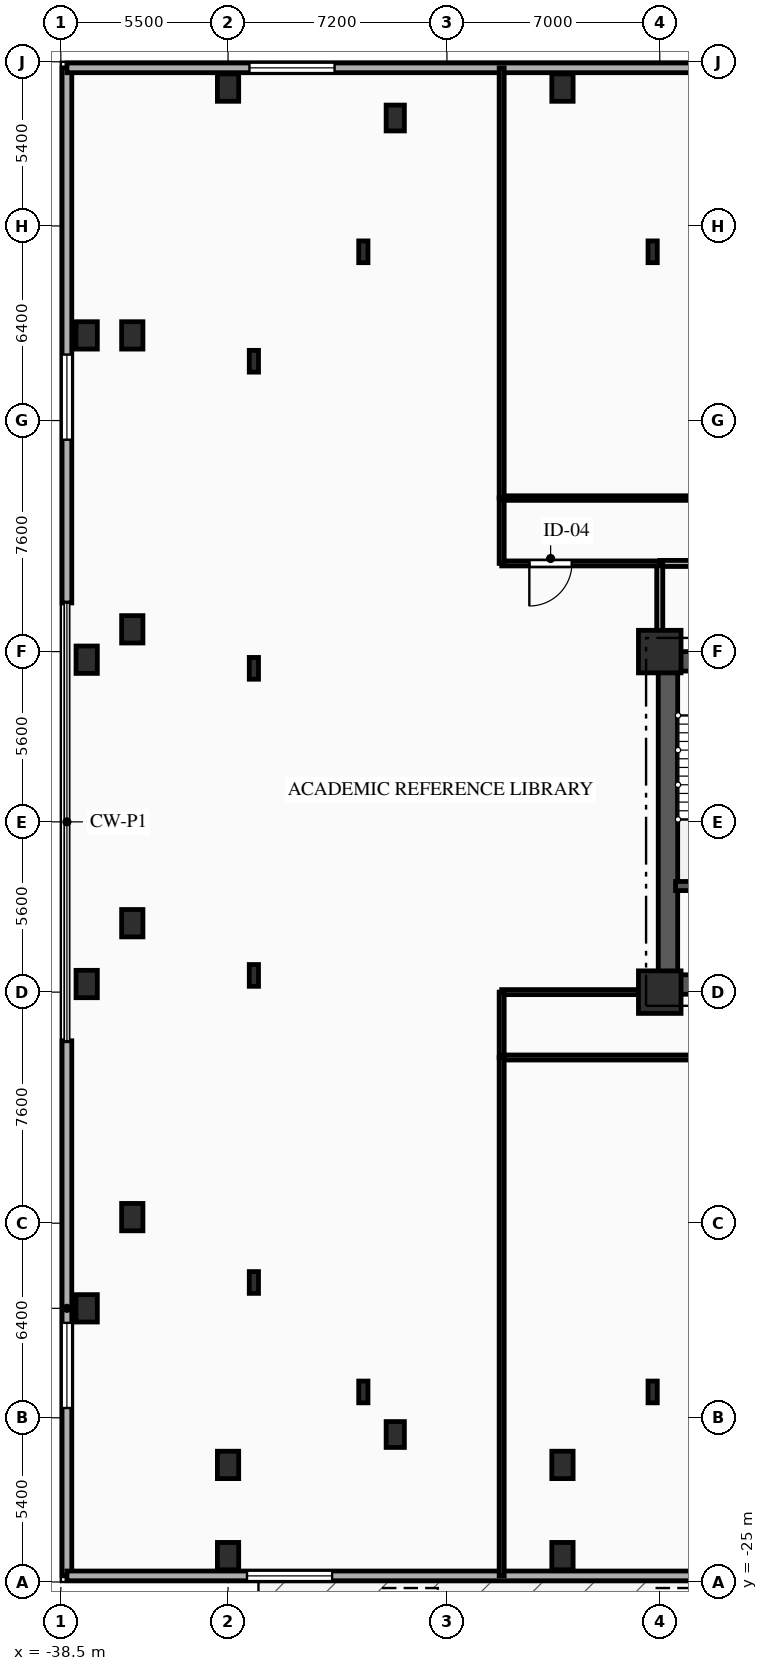
"""IFC4 building model, lengths in metres.
Left out: names, types, materials, properties, quantities, classifications, styles, units other than length and angle.
Written with IfcOpenShell. Run it as: python <this file> out.ifc"""

import sys

from ifc_helpers import new_model, si_unit, direction, frame, frame_2d, origin, origin_2d, place, context, subcontext, project, spatial, rectangle, i_section, extrude, element, fill, save


model = new_model("IFC4")
c1 = context("Model", 3, precision=1e-05, world=origin(), true_north=direction((0.0, 1.0)))
c2 = subcontext(c1, "Body", "Model", "MODEL_VIEW")
j1 = project(units=[si_unit("LENGTHUNIT", "METRE"), si_unit("PLANEANGLEUNIT", "RADIAN")], contexts=[c1])
p1 = place(None, origin())
s1 = spatial("IfcSite", under=j1, at=p1, CompositionType="ELEMENT")
p2 = place(p1, origin())
s2 = spatial("IfcBuilding", under=s1, at=p2, CompositionType="ELEMENT")
p3 = place(p2, frame((0.0, 0.0, 4.5)))
s3 = spatial("IfcBuildingStorey", under=s2, at=p3, CompositionType="ELEMENT", Elevation=4.5)
for number, where, z_axis, x_axis in (
    (1, (-18.8, -5.6, 0.0), (0.0, 0.0, 1.0), (1.0, 0.0, 0.0)),
    (2, (-18.8, 5.6, 0.0), (0.0, 0.0, 1.0), (1.0, 0.0, 0.0)),
):
    element("IfcColumn", number, at=place(p3, frame(where, z_axis=z_axis, x_axis=x_axis)), inside=s3, PredefinedType="COLUMN", context=c2, shape_type="SweptSolid", body=[
        extrude(rectangle(XDim=1.4, YDim=1.4, at=origin_2d()), origin(), (0.0, 0.0, 1.0), 4.5),
    ])
for number, where, z_axis, x_axis in (
    (3, (-33.0, -21.15, 0.0), (0.0, 0.0, 1.0), (1.0, 0.0, 0.0)),
    (4, (-22.0, -21.15, 0.0), (0.0, 0.0, 1.0), (1.0, 0.0, 0.0)),
    (5, (-33.0, 24.15, 0.0), (0.0, 0.0, 1.0), (1.0, 0.0, 0.0)),
    (6, (-22.0, 24.15, 0.0), (0.0, 0.0, 1.0), (1.0, 0.0, 0.0)),
    (7, (-36.15, -13.0, 0.0), (0.0, 0.0, 1.0), (1.0, 0.0, 0.0)),
    (8, (-36.15, -3.333, 0.0), (0.0, 0.0, 1.0), (1.0, 0.0, 0.0)),
    (9, (-36.15, 6.333, 0.0), (0.0, 0.0, 1.0), (1.0, 0.0, 0.0)),
    (10, (-36.15, 16.0, 0.0), (0.0, 0.0, 1.0), (1.0, 0.0, 0.0)),
    (11, (-33.0, -24.15, 0.0), (0.0, 0.0, 1.0), (1.0, 0.0, 0.0)),
    (12, (-22.0, -24.15, 0.0), (0.0, 0.0, 1.0), (1.0, 0.0, 0.0)),
    (13, (-37.65, -16.0, 0.0), (0.0, 0.0, 1.0), (1.0, 0.0, 0.0)),
    (14, (-37.65, -5.333, 0.0), (0.0, 0.0, 1.0), (1.0, 0.0, 0.0)),
    (15, (-37.65, 5.333, 0.0), (0.0, 0.0, 1.0), (1.0, 0.0, 0.0)),
    (16, (-37.65, 16.0, 0.0), (0.0, 0.0, 1.0), (1.0, 0.0, 0.0)),
):
    element("IfcColumn", number, at=place(p3, frame(where, z_axis=z_axis, x_axis=x_axis)), inside=s3, PredefinedType="COLUMN", context=c2, shape_type="SweptSolid", body=[
        extrude(rectangle(XDim=0.7, YDim=0.9, at=origin_2d()), origin(), (0.0, 0.0, 1.0), 4.5),
    ])
for number, where, z_axis, x_axis in (
    (17, (-27.5, -20.15, 0.0), (0.0, 0.0, 1.0), (1.0, 0.0, 0.0)),
    (18, (-27.5, 23.15, 0.0), (0.0, 0.0, 1.0), (1.0, 0.0, 0.0)),
):
    element("IfcColumn", number, at=place(p3, frame(where, z_axis=z_axis, x_axis=x_axis)), inside=s3, PredefinedType="PILASTER", context=c2, shape_type="SweptSolid", body=[
        extrude(rectangle(XDim=0.6, YDim=0.85, at=origin_2d()), origin(), (0.0, 0.0, 1.0), 4.5),
    ])
for number, where, z_axis, x_axis in (
    (19, (-28.55, -18.75, 0.0), (0.0, 0.0, 1.0), (1.0, 0.0, 0.0)),
    (20, (-19.033, -18.75, 0.0), (0.0, 0.0, 1.0), (1.0, 0.0, 0.0)),
    (21, (-19.033, 18.75, 0.0), (0.0, 0.0, 1.0), (1.0, 0.0, 0.0)),
    (22, (-28.55, 18.75, 0.0), (0.0, 0.0, 1.0), (1.0, 0.0, 0.0)),
    (23, (-32.15, 15.15, 0.0), (0.0, 0.0, 1.0), (1.0, 0.0, 0.0)),
    (24, (-32.15, 5.05, 0.0), (0.0, 0.0, 1.0), (1.0, 0.0, 0.0)),
    (25, (-32.15, -5.05, 0.0), (0.0, 0.0, 1.0), (1.0, 0.0, 0.0)),
    (26, (-32.15, -15.15, 0.0), (0.0, 0.0, 1.0), (1.0, 0.0, 0.0)),
):
    element("IfcColumn", number, at=place(p3, frame(where, z_axis=z_axis, x_axis=x_axis)), inside=s3, PredefinedType="COLUMN", context=c2, shape_type="SweptSolid", body=[
        extrude(i_section(OverallWidth=0.304, OverallDepth=0.716, WebThickness=0.021, FlangeThickness=0.04, FilletRadius=0.027, at=origin_2d()), origin(), (0.0, 0.0, 1.0), 4.5),
    ])
p4 = place(p3, frame((-38.3, -24.8, 0.0), z_axis=(0.0, 0.0, 1.0), x_axis=(0.0, 1.0, 0.0)))
e27 = element("IfcWall", 27, at=p4, inside=s3, PredefinedType="SOLIDWALL", context=c2, shape_type="SweptSolid", body=[
    extrude(rectangle(XDim=17.6, YDim=0.32, at=frame_2d((8.8, 0.0))), origin(), (0.0, 0.0, 1.0), 4.17),
])
p5 = place(p4, frame((5.522, 0.0, 0.85)))
e28 = element("IfcOpeningElement", 28, at=p5, cuts=e27, PredefinedType="OPENING", context=c2, shape_type="SweptSolid", body=[
    extrude(rectangle(XDim=2.8, YDim=2.4, at=frame_2d((1.4, 1.2))), frame((0.0, 0.17, 0.0), z_axis=(0.0, -1.0, 0.0), x_axis=(1.0, 0.0, 0.0)), (0.0, 0.0, 1.0), 0.34),
])
p6 = place(p3, frame((-38.3, 7.2, 0.0), z_axis=(0.0, 0.0, 1.0), x_axis=(0.0, 1.0, 0.0)))
e29 = element("IfcWall", 29, at=p6, inside=s3, PredefinedType="SOLIDWALL", context=c2, shape_type="SweptSolid", body=[
    extrude(rectangle(XDim=17.6, YDim=0.32, at=frame_2d((8.8, 0.0))), origin(), (0.0, 0.0, 1.0), 4.17),
])
p7 = place(p6, frame((5.37, 0.0, 0.85)))
e30 = element("IfcOpeningElement", 30, at=p7, cuts=e29, PredefinedType="OPENING", context=c2, shape_type="SweptSolid", body=[
    extrude(rectangle(XDim=2.8, YDim=2.4, at=frame_2d((1.4, 1.2))), frame((0.0, 0.17, 0.0), z_axis=(0.0, -1.0, 0.0), x_axis=(1.0, 0.0, 0.0)), (0.0, 0.0, 1.0), 0.34),
])
p8 = place(p3, frame((-38.3, 24.8, 0.0), z_axis=(0.0, 0.0, 1.0), x_axis=(1.0, 0.0, 0.0)))
e31 = element("IfcWall", 31, at=p8, inside=s3, PredefinedType="SOLIDWALL", context=c2, shape_type="SweptSolid", body=[
    extrude(rectangle(XDim=76.6, YDim=0.32, at=frame_2d((38.3, 0.0))), origin(), (0.0, 0.0, 1.0), 4.17),
])
p9 = place(p8, frame((6.004, 0.0, 0.85)))
e32 = element("IfcOpeningElement", 32, at=p9, cuts=e31, PredefinedType="OPENING", context=c2, shape_type="SweptSolid", body=[
    extrude(rectangle(XDim=2.8, YDim=2.4, at=frame_2d((1.4, 1.2))), frame((0.0, 0.17, 0.0), z_axis=(0.0, -1.0, 0.0), x_axis=(1.0, 0.0, 0.0)), (0.0, 0.0, 1.0), 0.34),
])
p10 = place(p8, frame((30.291, 0.0, 0.85)))
e33 = element("IfcOpeningElement", 33, at=p10, cuts=e31, PredefinedType="OPENING", context=c2, shape_type="SweptSolid", body=[
    extrude(rectangle(XDim=2.8, YDim=2.4, at=frame_2d((1.4, 1.2))), frame((0.0, 0.17, 0.0), z_axis=(0.0, -1.0, 0.0), x_axis=(1.0, 0.0, 0.0)), (0.0, 0.0, 1.0), 0.34),
])
p11 = place(p8, frame((67.876, 0.0, 0.85)))
e34 = element("IfcOpeningElement", 34, at=p11, cuts=e31, PredefinedType="OPENING", context=c2, shape_type="SweptSolid", body=[
    extrude(rectangle(XDim=2.8, YDim=2.4, at=frame_2d((1.4, 1.2))), frame((0.0, 0.17, 0.0), z_axis=(0.0, -1.0, 0.0), x_axis=(1.0, 0.0, 0.0)), (0.0, 0.0, 1.0), 0.34),
])
p12 = place(p3, frame((38.3, -24.8, 0.0), z_axis=(0.0, 0.0, 1.0), x_axis=(-1.0, 0.0, 0.0)))
e35 = element("IfcWall", 35, at=p12, inside=s3, PredefinedType="SOLIDWALL", context=c2, shape_type="SweptSolid", body=[
    extrude(rectangle(XDim=76.6, YDim=0.32, at=frame_2d((38.3, 0.0))), origin(), (0.0, 0.0, 1.0), 4.17),
])
p13 = place(p12, frame((6.004, 0.0, 0.85)))
e36 = element("IfcOpeningElement", 36, at=p13, cuts=e35, PredefinedType="OPENING", context=c2, shape_type="SweptSolid", body=[
    extrude(rectangle(XDim=2.8, YDim=2.4, at=frame_2d((1.4, 1.2))), frame((0.0, 0.17, 0.0), z_axis=(0.0, -1.0, 0.0), x_axis=(1.0, 0.0, 0.0)), (0.0, 0.0, 1.0), 0.34),
])
p14 = place(p12, frame((30.697, 0.0, 0.85)))
e37 = element("IfcOpeningElement", 37, at=p14, cuts=e35, PredefinedType="OPENING", context=c2, shape_type="SweptSolid", body=[
    extrude(rectangle(XDim=2.8, YDim=2.4, at=frame_2d((1.4, 1.2))), frame((0.0, 0.17, 0.0), z_axis=(0.0, -1.0, 0.0), x_axis=(1.0, 0.0, 0.0)), (0.0, 0.0, 1.0), 0.34),
])
p15 = place(p12, frame((50.587, 0.0, 0.85)))
e38 = element("IfcOpeningElement", 38, at=p15, cuts=e35, PredefinedType="OPENING", context=c2, shape_type="SweptSolid", body=[
    extrude(rectangle(XDim=2.8, YDim=2.4, at=frame_2d((1.4, 1.2))), frame((0.0, 0.17, 0.0), z_axis=(0.0, -1.0, 0.0), x_axis=(1.0, 0.0, 0.0)), (0.0, 0.0, 1.0), 0.34),
])
p16 = place(p12, frame((67.876, 0.0, 0.85)))
e39 = element("IfcOpeningElement", 39, at=p16, cuts=e35, PredefinedType="OPENING", context=c2, shape_type="SweptSolid", body=[
    extrude(rectangle(XDim=2.8, YDim=2.4, at=frame_2d((1.4, 1.2))), frame((0.0, 0.17, 0.0), z_axis=(0.0, -1.0, 0.0), x_axis=(1.0, 0.0, 0.0)), (0.0, 0.0, 1.0), 0.34),
])
p17 = place(p3, frame((-18.8, 5.28, 0.0), z_axis=(0.0, 0.0, 1.0), x_axis=(1.0, 0.0, 0.0)))
e40 = element("IfcWall", 40, at=p17, inside=s3, PredefinedType="SHEAR", context=c2, shape_type="SweptSolid", body=[
    extrude(rectangle(XDim=9.6, YDim=0.64, at=frame_2d((4.8, 0.0))), origin(), (0.0, 0.0, 1.0), 4.17),
])
p18 = place(p17, frame((1.55, 0.0, 0.0)))
e41 = element("IfcOpeningElement", 41, at=p18, cuts=e40, PredefinedType="OPENING", context=c2, shape_type="SweptSolid", body=[
    extrude(rectangle(XDim=1.1, YDim=2.15, at=frame_2d((0.55, 1.075))), frame((0.0, 0.33, 0.0), z_axis=(0.0, -1.0, 0.0), x_axis=(1.0, 0.0, 0.0)), (0.0, 0.0, 1.0), 0.66),
])
p19 = place(p17, frame((4.775, 0.0, 0.0)))
e42 = element("IfcOpeningElement", 42, at=p19, cuts=e40, PredefinedType="OPENING", context=c2, shape_type="SweptSolid", body=[
    extrude(rectangle(XDim=1.05, YDim=2.1, at=frame_2d((0.525, 1.05))), frame((0.0, 0.33, 0.0), z_axis=(0.0, -1.0, 0.0), x_axis=(1.0, 0.0, 0.0)), (0.0, 0.0, 1.0), 0.66),
])
p20 = place(p3, frame((-18.8, -5.35, 0.0), z_axis=(0.0, 0.0, 1.0), x_axis=(1.0, 0.0, 0.0)))
e43 = element("IfcWall", 43, at=p20, inside=s3, PredefinedType="SHEAR", context=c2, shape_type="SweptSolid", body=[
    extrude(rectangle(XDim=9.6, YDim=0.64, at=frame_2d((4.8, 0.0))), origin(), (0.0, 0.0, 1.0), 4.17),
])
p21 = place(p20, frame((1.05, 0.0, 0.0)))
e44 = element("IfcOpeningElement", 44, at=p21, cuts=e43, PredefinedType="OPENING", context=c2, shape_type="SweptSolid", body=[
    extrude(rectangle(XDim=0.9, YDim=2.1, at=frame_2d((0.45, 1.05))), frame((0.0, 0.33, 0.0), z_axis=(0.0, -1.0, 0.0), x_axis=(1.0, 0.0, 0.0)), (0.0, 0.0, 1.0), 0.66),
])
p22 = place(p3, frame((-18.53, -5.05, 0.0), z_axis=(0.0, 0.0, 1.0), x_axis=(0.0, 1.0, 0.0)))
e45 = element("IfcWall", 45, at=p22, inside=s3, PredefinedType="SHEAR", context=c2, shape_type="SweptSolid", body=[
    extrude(rectangle(XDim=10.1, YDim=0.64, at=frame_2d((5.05, 0.0))), origin(), (0.0, 0.0, 1.0), 4.17),
])
p23 = place(p3, frame((-18.28, -2.11, 0.0), z_axis=(0.0, 0.0, 1.0), x_axis=(1.0, 0.0, 0.0)))
e46 = element("IfcWall", 46, at=p23, inside=s3, PredefinedType="SHEAR", context=c2, shape_type="SweptSolid", body=[
    extrude(rectangle(XDim=3.18, YDim=0.3, at=frame_2d((1.59, 0.0))), origin(), (0.0, 0.0, 1.0), 4.17),
])
p24 = place(p3, frame((-12.0, 8.5, 0.0), z_axis=(0.0, 0.0, 1.0), x_axis=(-1.0, 0.0, 0.0)))
e47 = element("IfcWall", 47, at=p24, inside=s3, PredefinedType="PARTITIONING", context=c2, shape_type="SweptSolid", body=[
    extrude(rectangle(XDim=6.8, YDim=0.2, at=frame_2d((3.4, 0.0))), origin(), (0.0, 0.0, 1.0), 4.17),
])
p25 = place(p24, frame((1.715, 0.0, 0.0)))
e48 = element("IfcOpeningElement", 48, at=p25, cuts=e47, PredefinedType="OPENING", context=c2, shape_type="SweptSolid", body=[
    extrude(rectangle(XDim=1.1, YDim=2.15, at=frame_2d((0.55, 1.075))), frame((0.0, 0.11, 0.0), z_axis=(0.0, -1.0, 0.0), x_axis=(1.0, 0.0, 0.0)), (0.0, 0.0, 1.0), 0.22),
])
p26 = place(p3, frame((-18.8, 8.5, 0.0), z_axis=(0.0, 0.0, 1.0), x_axis=(0.0, -1.0, 0.0)))
e49 = element("IfcWall", 49, at=p26, inside=s3, PredefinedType="PARTITIONING", context=c2, shape_type="SweptSolid", body=[
    extrude(rectangle(XDim=2.9, YDim=0.2, at=frame_2d((1.45, 0.0))), origin(), (0.0, 0.0, 1.0), 3.655),
])
p27 = place(p3, frame((-18.8, 8.5, 0.0), z_axis=(0.0, 0.0, 1.0), x_axis=(-1.0, 0.0, 0.0)))
e50 = element("IfcWall", 50, at=p27, inside=s3, PredefinedType="PARTITIONING", context=c2, shape_type="SweptSolid", body=[
    extrude(rectangle(XDim=5.2, YDim=0.165, at=frame_2d((2.6, 0.0))), origin(), (0.0, 0.0, 1.0), 4.17),
])
p28 = place(p27, frame((2.89, 0.0, 0.0)))
e51 = element("IfcOpeningElement", 51, at=p28, cuts=e50, PredefinedType="OPENING", context=c2, shape_type="SweptSolid", body=[
    extrude(rectangle(XDim=1.4, YDim=2.3, at=frame_2d((0.7, 1.15))), frame((0.0, 0.093, 0.0), z_axis=(0.0, -1.0, 0.0), x_axis=(1.0, 0.0, 0.0)), (0.0, 0.0, 1.0), 0.185),
])
p29 = place(p3, frame((-24.0, 8.5, 0.0), z_axis=(0.0, 0.0, 1.0), x_axis=(0.0, 1.0, 0.0)))
e52 = element("IfcWall", 52, at=p29, inside=s3, PredefinedType="PARTITIONING", context=c2, shape_type="SweptSolid", body=[
    extrude(rectangle(XDim=2.15, YDim=0.165, at=frame_2d((1.075, 0.0))), origin(), (0.0, 0.0, 1.0), 4.17),
])
p30 = place(p3, frame((-24.0, 10.65, 0.0), z_axis=(0.0, 0.0, 1.0), x_axis=(1.0, 0.0, 0.0)))
e53 = element("IfcWall", 53, at=p30, inside=s3, PredefinedType="PARTITIONING", context=c2, shape_type="SweptSolid", body=[
    extrude(rectangle(XDim=24.0, YDim=0.15, at=frame_2d((12.0, 0.0))), origin(), (0.0, 0.0, 1.0), 4.17),
])
p31 = place(p30, frame((19.646, 0.0, 0.0)))
e54 = element("IfcOpeningElement", 54, at=p31, cuts=e53, PredefinedType="OPENING", context=c2, shape_type="SweptSolid", body=[
    extrude(rectangle(XDim=1.05, YDim=2.15, at=frame_2d((0.525, 1.075))), frame((0.0, 0.085, 0.0), z_axis=(0.0, -1.0, 0.0), x_axis=(1.0, 0.0, 0.0)), (0.0, 0.0, 1.0), 0.17),
])
p32 = place(p3, frame((-24.0, -5.6, 0.0), z_axis=(0.0, 0.0, 1.0), x_axis=(1.0, 0.0, 0.0)))
e55 = element("IfcWall", 55, at=p32, inside=s3, PredefinedType="PARTITIONING", context=c2, shape_type="SweptSolid", body=[
    extrude(rectangle(XDim=5.2, YDim=0.165, at=frame_2d((2.6, 0.0))), origin(), (0.0, 0.0, 1.0), 4.17),
])
p33 = place(p3, frame((-24.0, -7.75, 0.0), z_axis=(0.0, 0.0, 1.0), x_axis=(0.0, 1.0, 0.0)))
e56 = element("IfcWall", 56, at=p33, inside=s3, PredefinedType="PARTITIONING", context=c2, shape_type="SweptSolid", body=[
    extrude(rectangle(XDim=2.15, YDim=0.165, at=frame_2d((1.075, 0.0))), origin(), (0.0, 0.0, 1.0), 4.17),
])
p34 = place(p3, frame((-3.32, -7.75, 0.0), z_axis=(0.0, 0.0, 1.0), x_axis=(-1.0, 0.0, 0.0)))
e57 = element("IfcWall", 57, at=p34, inside=s3, PredefinedType="PARTITIONING", context=c2, shape_type="SweptSolid", body=[
    extrude(rectangle(XDim=20.68, YDim=0.165, at=frame_2d((10.34, 0.0))), origin(), (0.0, 0.0, 1.0), 4.17),
])
p35 = place(p34, frame((9.64, 0.0, 0.0)))
e58 = element("IfcOpeningElement", 58, at=p35, cuts=e57, PredefinedType="OPENING", context=c2, shape_type="SweptSolid", body=[
    extrude(rectangle(XDim=1.4, YDim=2.3, at=frame_2d((0.7, 1.15))), frame((0.0, 0.093, 0.0), z_axis=(0.0, -1.0, 0.0), x_axis=(1.0, 0.0, 0.0)), (0.0, 0.0, 1.0), 0.185),
])
p36 = place(p3, frame((-24.0, 24.8, 0.0), z_axis=(0.0, 0.0, 1.0), x_axis=(0.0, -1.0, 0.0)))
e59 = element("IfcWall", 59, at=p36, inside=s3, PredefinedType="PARTITIONING", context=c2, shape_type="SweptSolid", body=[
    extrude(rectangle(XDim=14.15, YDim=0.165, at=frame_2d((7.075, 0.0))), origin(), (0.0, 0.0, 1.0), 4.17),
])
p37 = place(p3, frame((-24.0, -7.75, 0.0), z_axis=(0.0, 0.0, 1.0), x_axis=(0.0, -1.0, 0.0)))
e60 = element("IfcWall", 60, at=p37, inside=s3, PredefinedType="PARTITIONING", context=c2, shape_type="SweptSolid", body=[
    extrude(rectangle(XDim=17.05, YDim=0.165, at=frame_2d((8.525, 0.0))), origin(), (0.0, 0.0, 1.0), 4.17),
])
p38 = place(p5, origin())
e61 = element("IfcWindow", 61, at=p38, inside=s3, PartitioningType="SINGLE_PANEL", PredefinedType="WINDOW", context=c2, shape_type="SweptSolid", body=[
    extrude(rectangle(XDim=2.8, YDim=2.4, at=frame_2d((1.4, 1.2))), frame((0.0, 0.03, 0.0), z_axis=(0.0, -1.0, 0.0), x_axis=(1.0, 0.0, 0.0)), (0.0, 0.0, 1.0), 0.06),
])
fill(e28, e61)
p39 = place(p7, origin())
e62 = element("IfcWindow", 62, at=p39, inside=s3, PartitioningType="SINGLE_PANEL", PredefinedType="WINDOW", context=c2, shape_type="SweptSolid", body=[
    extrude(rectangle(XDim=2.8, YDim=2.4, at=frame_2d((1.4, 1.2))), frame((0.0, 0.03, 0.0), z_axis=(0.0, -1.0, 0.0), x_axis=(1.0, 0.0, 0.0)), (0.0, 0.0, 1.0), 0.06),
])
fill(e30, e62)
p40 = place(p9, origin())
e63 = element("IfcWindow", 63, at=p40, inside=s3, PartitioningType="SINGLE_PANEL", PredefinedType="WINDOW", context=c2, shape_type="SweptSolid", body=[
    extrude(rectangle(XDim=2.8, YDim=2.4, at=frame_2d((1.4, 1.2))), frame((0.0, 0.03, 0.0), z_axis=(0.0, -1.0, 0.0), x_axis=(1.0, 0.0, 0.0)), (0.0, 0.0, 1.0), 0.06),
])
fill(e32, e63)
p41 = place(p16, origin())
e64 = element("IfcWindow", 64, at=p41, inside=s3, PartitioningType="SINGLE_PANEL", PredefinedType="WINDOW", context=c2, shape_type="SweptSolid", body=[
    extrude(rectangle(XDim=2.8, YDim=2.4, at=frame_2d((1.4, 1.2))), frame((0.0, 0.03, 0.0), z_axis=(0.0, -1.0, 0.0), x_axis=(1.0, 0.0, 0.0)), (0.0, 0.0, 1.0), 0.06),
])
fill(e39, e64)
p42 = place(p3, frame((0.0, 0.0, -0.24)))
p43 = place(p42, frame((-27.0, -26.1, 0.0)))
p44 = place(p43, frame((0.0, 0.0, 0.19)))
e65 = element("IfcWindow", 65, at=p44, inside=s3, PartitioningType="SINGLE_PANEL", PredefinedType="SKYLIGHT", context=c2, shape_type="SweptSolid", body=[
    extrude(rectangle(XDim=1.8, YDim=1.8, at=origin_2d()), origin(), (0.0, 0.0, 1.0), 0.05),
])
p45 = place(p42, frame((-18.0, -26.1, 0.0)))
p46 = place(p45, frame((0.0, 0.0, 0.19)))
e66 = element("IfcWindow", 66, at=p46, inside=s3, PartitioningType="SINGLE_PANEL", PredefinedType="SKYLIGHT", context=c2, shape_type="SweptSolid", body=[
    extrude(rectangle(XDim=1.8, YDim=1.8, at=origin_2d()), origin(), (0.0, 0.0, 1.0), 0.05),
])
p47 = place(p28, origin())
e67 = element("IfcDoor", 67, at=p47, inside=s3, OperationType="SINGLE_SWING_RIGHT", PredefinedType="DOOR", context=c2, shape_type="SweptSolid", body=[
    extrude(rectangle(XDim=1.4, YDim=2.3, at=frame_2d((0.7, 1.15))), frame((0.0, 0.025, 0.0), z_axis=(0.0, -1.0, 0.0), x_axis=(1.0, 0.0, 0.0)), (0.0, 0.0, 1.0), 0.05),
])
fill(e51, e67)
save(model, sys.argv[1])
